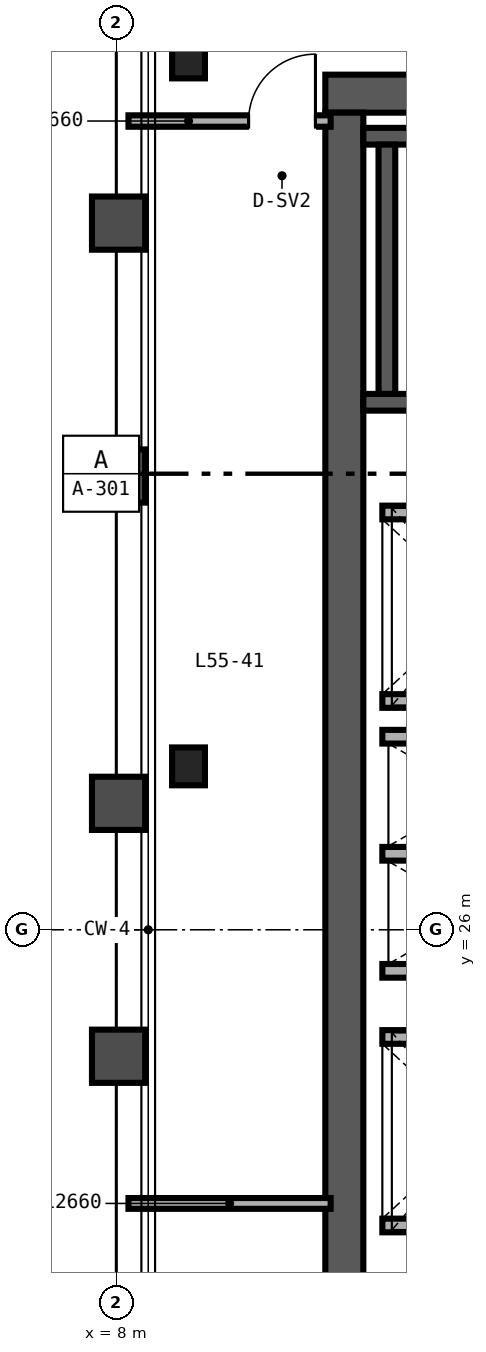
"""IFC4 building model, lengths in metres.
Left out: names, types, materials, properties, quantities, classifications, styles, units other than length and angle.
Written with IfcOpenShell. Run it as: python <this file> out.ifc"""

import sys

from ifc_helpers import new_model, si_unit, direction, frame, frame_2d, origin, origin_2d, place, context, subcontext, project, spatial, rectangle, i_section, extrude, source, transform, mapped, element, fill, save


model = new_model("IFC4")
c1 = context("Model", 3, precision=1e-05, world=origin(), true_north=direction((0.0, 1.0)))
c2 = subcontext(c1, "Body", "Model", "MODEL_VIEW")
j1 = project(units=[si_unit("LENGTHUNIT", "METRE"), si_unit("PLANEANGLEUNIT", "RADIAN")], contexts=[c1])
p1 = place(None, origin())
s1 = spatial("IfcSite", under=j1, at=p1, CompositionType="ELEMENT")
p2 = place(p1, origin())
s2 = spatial("IfcBuilding", under=s1, at=p2, CompositionType="ELEMENT")
p3 = place(p2, frame((0.0, 0.0, 217.2)))
s3 = spatial("IfcBuildingStorey", under=s2, at=p3, CompositionType="ELEMENT", Elevation=217.2)
p4 = place(p3, frame((10.75, 37.0, 0.0), z_axis=(0.0, 0.0, 1.0), x_axis=(1.0, 0.0, 0.0)))
e1 = element("IfcWall", 1, at=p4, inside=s3, PredefinedType="SHEAR", context=c2, shape_type="SweptSolid", body=[
    extrude(rectangle(XDim=12.5, YDim=0.5, at=frame_2d((6.25, 0.0))), origin(), (0.0, 0.0, 1.0), 3.28),
])
p5 = place(p4, frame((10.35, 0.0, 0.0)))
e2 = element("IfcOpeningElement", 2, at=p5, cuts=e1, PredefinedType="OPENING", context=c2, shape_type="SweptSolid", body=[
    extrude(rectangle(XDim=1.0, YDim=2.15, at=frame_2d((0.5, 1.075))), frame((0.0, 0.26, 0.0), z_axis=(0.0, -1.0, 0.0), x_axis=(1.0, 0.0, 0.0)), (0.0, 0.0, 1.0), 0.52),
])
p6 = place(p3, frame((11.0, 15.25, 0.0), z_axis=(0.0, 0.0, 1.0), x_axis=(0.0, 1.0, 0.0)))
e3 = element("IfcWall", 3, at=p6, inside=s3, PredefinedType="SHEAR", context=c2, shape_type="SweptSolid", body=[
    extrude(rectangle(XDim=21.5, YDim=0.5, at=frame_2d((10.75, 0.0))), origin(), (0.0, 0.0, 1.0), 3.28),
])
p7 = place(p3, frame((11.25, 32.94, 0.0), z_axis=(0.0, 0.0, 1.0), x_axis=(1.0, 0.0, 0.0)))
e4 = element("IfcWall", 4, at=p7, inside=s3, PredefinedType="SHEAR", context=c2, shape_type="SweptSolid", body=[
    extrude(rectangle(XDim=8.06, YDim=0.22, at=frame_2d((4.03, 0.0))), origin(), (0.0, 0.0, 1.0), 3.4),
])
p8 = place(p7, frame((0.67, 0.0, 0.0)))
e5 = element("IfcOpeningElement", 5, at=p8, cuts=e4, PredefinedType="OPENING", context=c2, shape_type="SweptSolid", body=[
    extrude(rectangle(XDim=1.05, YDim=2.15, at=frame_2d((0.525, 1.075))), frame((0.0, 0.12, 0.0), z_axis=(0.0, -1.0, 0.0), x_axis=(1.0, 0.0, 0.0)), (0.0, 0.0, 1.0), 0.24),
])
p9 = place(p3, frame((11.25, 36.44, 0.0), z_axis=(0.0, 0.0, 1.0), x_axis=(1.0, 0.0, 0.0)))
e6 = element("IfcWall", 6, at=p9, inside=s3, PredefinedType="SHEAR", context=c2, shape_type="SweptSolid", body=[
    extrude(rectangle(XDim=8.06, YDim=0.22, at=frame_2d((4.03, 0.0))), origin(), (0.0, 0.0, 1.0), 3.4),
])
p10 = place(p3, frame((11.56, 33.05, 0.0), z_axis=(0.0, 0.0, 1.0), x_axis=(0.0, 1.0, 0.0)))
e7 = element("IfcWall", 7, at=p10, inside=s3, PredefinedType="SHEAR", context=c2, shape_type="SweptSolid", body=[
    extrude(rectangle(XDim=3.28, YDim=0.22, at=frame_2d((1.64, 0.0))), origin(), (0.0, 0.0, 1.0), 3.4),
])
m1 = source(origin(), c2, "Body", "SweptSolid", [
    extrude(i_section(OverallWidth=0.432, OverallDepth=0.498, WebThickness=0.056, FlangeThickness=0.089, FilletRadius=0.025, at=origin_2d()), origin(), (0.0, 0.0, 1.0), 3.28),
])
for number, where, z_axis, x_axis in (
    (8, (8.95, 28.15, 0.0), (0.0, 0.0, 1.0), (1.0, 0.0, 0.0)),
    (9, (8.95, 37.45, 0.0), (0.0, 0.0, 1.0), (1.0, 0.0, 0.0)),
):
    element("IfcColumn", number, at=place(p3, frame(where, z_axis=z_axis, x_axis=x_axis)), inside=s3, PredefinedType="COLUMN", context=c2, shape_type="MappedRepresentation", body=[
        mapped(m1, transform((0.0, 0.0, 0.0), scale=1.0)),
    ])
for number, where, z_axis, x_axis in (
    (10, (11.5, 22.11, 0.0), (0.0, 0.0, 1.0), (1.0, 0.0, 0.0)),
    (11, (11.5, 24.59, 0.0), (0.0, 0.0, 1.0), (1.0, 0.0, 0.0)),
    (12, (11.5, 29.01, 0.0), (0.0, 0.0, 1.0), (1.0, 0.0, 0.0)),
    (13, (11.5, 31.49, 0.0), (0.0, 0.0, 1.0), (1.0, 0.0, 0.0)),
):
    element("IfcWall", number, at=place(p3, frame(where, z_axis=z_axis, x_axis=x_axis)), inside=s3, PredefinedType="SOLIDWALL", context=c2, shape_type="SweptSolid", body=[
        extrude(rectangle(XDim=2.5, YDim=0.18, at=frame_2d((1.25, 0.0))), origin(), (0.0, 0.0, 1.0), 3.28),
    ])
for number, where, z_axis, x_axis in (
    (14, (11.5, 25.46, 0.0), (0.0, 0.0, 1.0), (1.0, 0.0, 0.0)),
    (15, (11.5, 27.0, 0.0), (0.0, 0.0, 1.0), (1.0, 0.0, 0.0)),
    (16, (11.5, 28.54, 0.0), (0.0, 0.0, 1.0), (1.0, 0.0, 0.0)),
):
    element("IfcWall", number, at=place(p3, frame(where, z_axis=z_axis, x_axis=x_axis)), inside=s3, PredefinedType="SOLIDWALL", context=c2, shape_type="SweptSolid", body=[
        extrude(rectangle(XDim=2.51, YDim=0.18, at=frame_2d((1.255, 0.0))), origin(), (0.0, 0.0, 1.0), 3.28),
    ])
p11 = place(p3, frame((8.16, 36.64, 0.0), z_axis=(0.0, 0.0, 1.0), x_axis=(1.0, 0.0, 0.0)))
e17 = element("IfcWall", 17, at=p11, inside=s3, PredefinedType="PARTITIONING", context=c2, shape_type="SweptSolid", body=[
    extrude(rectangle(XDim=2.66, YDim=0.15, at=frame_2d((1.33, 0.0))), origin(), (0.0, 0.0, 1.0), 2.663),
])
p12 = place(p11, frame((1.58, 0.0, 0.0)))
e18 = element("IfcOpeningElement", 18, at=p12, cuts=e17, PredefinedType="OPENING", context=c2, shape_type="SweptSolid", body=[
    extrude(rectangle(XDim=0.88, YDim=2.15, at=frame_2d((0.44, 1.075))), frame((0.0, 0.085, 0.0), z_axis=(0.0, -1.0, 0.0), x_axis=(1.0, 0.0, 0.0)), (0.0, 0.0, 1.0), 0.17),
])
p13 = place(p3, frame((8.16, 22.4, 0.0), z_axis=(0.0, 0.0, 1.0), x_axis=(1.0, 0.0, 0.0)))
e19 = element("IfcWall", 19, at=p13, inside=s3, PredefinedType="PARTITIONING", context=c2, shape_type="SweptSolid", body=[
    extrude(rectangle(XDim=2.66, YDim=0.142, at=frame_2d((1.33, 0.0))), origin(), (0.0, 0.0, 1.0), 2.501),
])
m2 = source(origin(), c2, "Body", "SweptSolid", [
    extrude(rectangle(XDim=0.88, YDim=2.15, at=frame_2d((0.44, 1.075))), frame((0.0, 0.025, 0.0), z_axis=(0.0, -1.0, 0.0), x_axis=(1.0, 0.0, 0.0)), (0.0, 0.0, 1.0), 0.05),
])
p14 = place(p12, origin())
e20 = element("IfcDoor", 20, at=p14, inside=s3, OperationType="SINGLE_SWING_RIGHT", PredefinedType="DOOR", context=c2, shape_type="MappedRepresentation", body=[
    mapped(m2, transform((0.0, 0.0, 0.0), scale=1.0)),
])
fill(e18, e20)
save(model, sys.argv[1])
